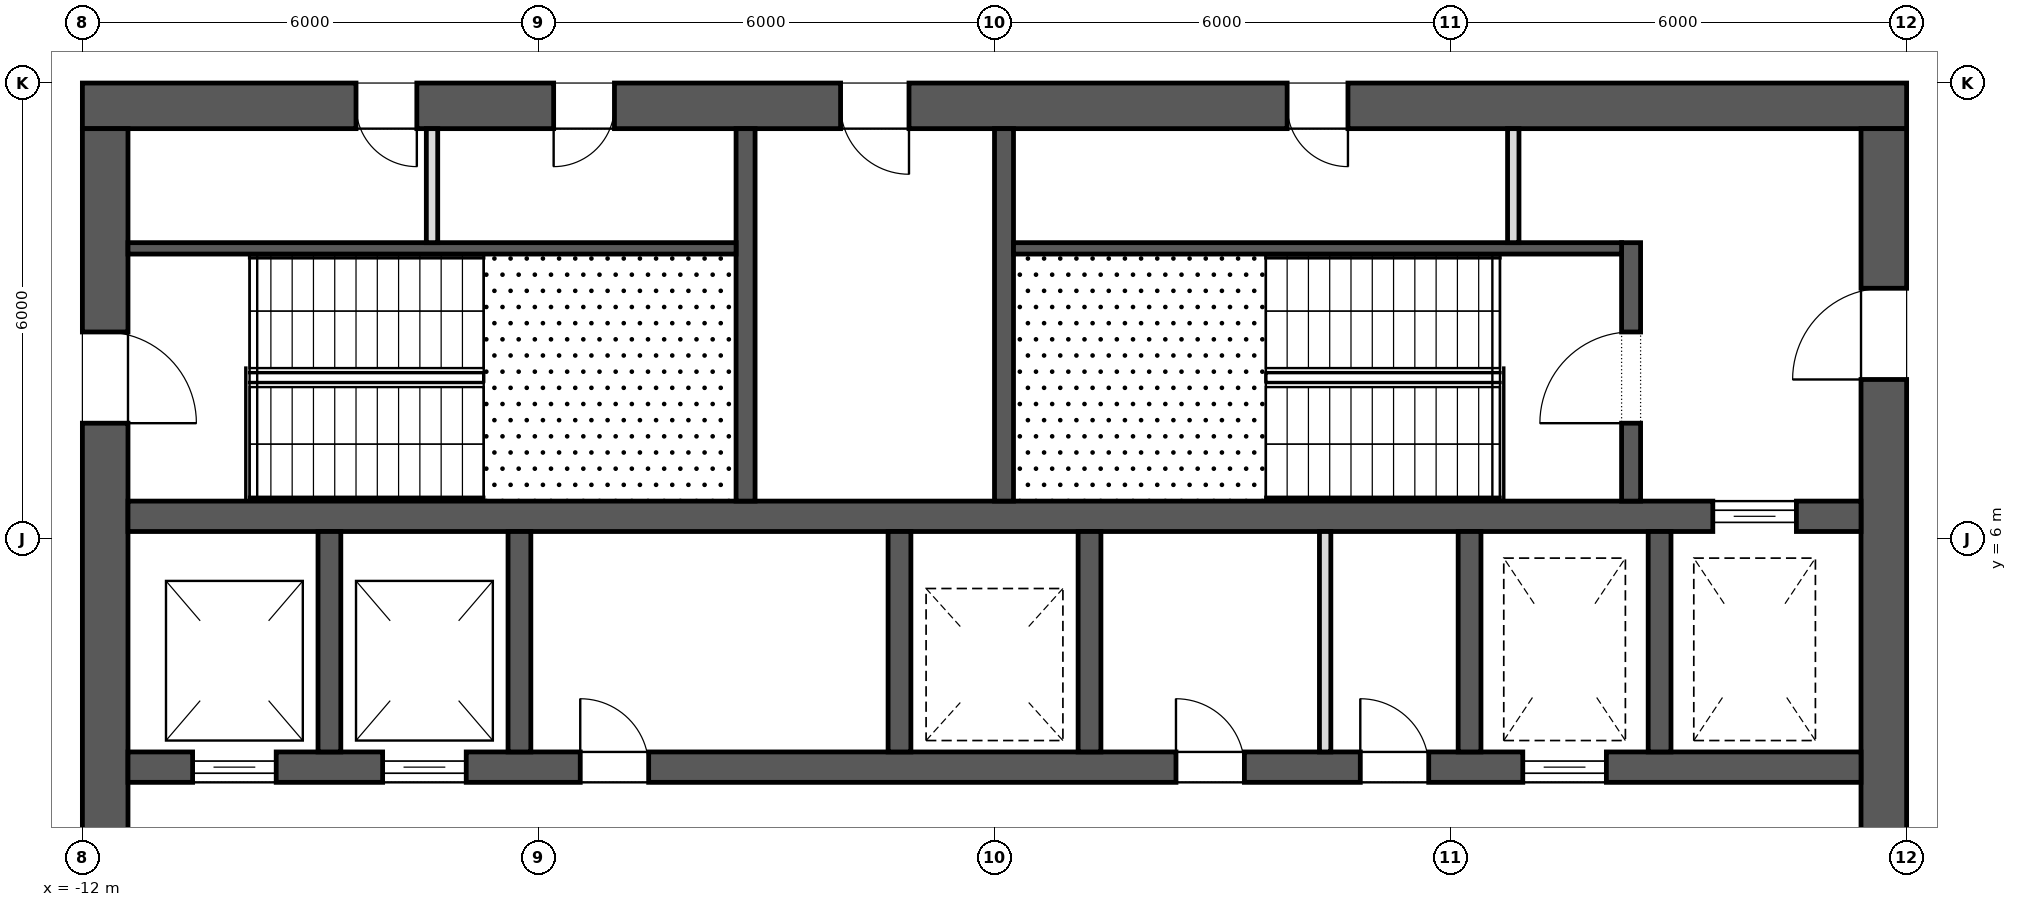
"""IFC4 building model, lengths in metres.
Left out: names, types, materials, properties, quantities, classifications, styles, units other than length and angle.
Written with IfcOpenShell. Run it as: python <this file> out.ifc"""

import sys

from ifc_helpers import new_model, si_unit, direction, frame, frame_2d, origin, place, context, subcontext, project, spatial, rectangle, extrude, element, fill, save


model = new_model("IFC4")
c1 = context("Model", 3, precision=1e-05, world=origin(), true_north=direction((0.0, 1.0)))
c2 = subcontext(c1, "Body", "Model", "MODEL_VIEW")
j1 = project(units=[si_unit("LENGTHUNIT", "METRE"), si_unit("PLANEANGLEUNIT", "RADIAN")], contexts=[c1])
p1 = place(None, origin())
s1 = spatial("IfcSite", under=j1, at=p1, CompositionType="ELEMENT")
p2 = place(p1, origin())
s2 = spatial("IfcBuilding", under=s1, at=p2, CompositionType="ELEMENT")
p3 = place(p2, frame((0.0, 0.0, 300.3)))
s3 = spatial("IfcBuildingStorey", under=s2, at=p3, CompositionType="ELEMENT", Elevation=300.3)
p4 = place(p3, frame((-12.0, 11.7, 0.0), z_axis=(0.0, 0.0, 1.0), x_axis=(1.0, 0.0, 0.0)))
e1 = element("IfcWall", 1, at=p4, inside=s3, PredefinedType="SHEAR", context=c2, shape_type="SweptSolid", body=[
    extrude(rectangle(XDim=24.0, YDim=0.6, at=frame_2d((12.0, 0.0))), origin(), (0.0, 0.0, 1.0), 4.0),
])
p5 = place(p4, frame((9.975, 0.0, 0.0)))
e2 = element("IfcOpeningElement", 2, at=p5, cuts=e1, PredefinedType="OPENING", context=c2, shape_type="SweptSolid", body=[
    extrude(rectangle(XDim=0.9, YDim=2.1, at=frame_2d((0.45, 1.05))), frame((0.0, 0.312, 0.0), z_axis=(0.0, -1.0, 0.0), x_axis=(1.0, 0.0, 0.0)), (0.0, 0.0, 1.0), 0.624),
])
p6 = place(p4, frame((3.6, 0.0, 0.0)))
e3 = element("IfcOpeningElement", 3, at=p6, cuts=e1, PredefinedType="OPENING", context=c2, shape_type="SweptSolid", body=[
    extrude(rectangle(XDim=0.8, YDim=2.1, at=frame_2d((0.4, 1.05))), frame((0.0, 0.312, 0.0), z_axis=(0.0, -1.0, 0.0), x_axis=(1.0, 0.0, 0.0)), (0.0, 0.0, 1.0), 0.624),
])
p7 = place(p4, frame((6.2, 0.0, 0.0)))
e4 = element("IfcOpeningElement", 4, at=p7, cuts=e1, PredefinedType="OPENING", context=c2, shape_type="SweptSolid", body=[
    extrude(rectangle(XDim=0.8, YDim=2.1, at=frame_2d((0.4, 1.05))), frame((0.0, 0.312, 0.0), z_axis=(0.0, -1.0, 0.0), x_axis=(1.0, 0.0, 0.0)), (0.0, 0.0, 1.0), 0.624),
])
p8 = place(p4, frame((15.85, 0.0, 0.0)))
e5 = element("IfcOpeningElement", 5, at=p8, cuts=e1, PredefinedType="OPENING", context=c2, shape_type="SweptSolid", body=[
    extrude(rectangle(XDim=0.8, YDim=2.1, at=frame_2d((0.4, 1.05))), frame((0.0, 0.312, 0.0), z_axis=(0.0, -1.0, 0.0), x_axis=(1.0, 0.0, 0.0)), (0.0, 0.0, 1.0), 0.624),
])
p9 = place(p3, frame((11.7, -11.4, 0.0), z_axis=(0.0, 0.0, 1.0), x_axis=(0.0, 1.0, 0.0)))
e6 = element("IfcWall", 6, at=p9, inside=s3, PredefinedType="SHEAR", context=c2, shape_type="SweptSolid", body=[
    extrude(rectangle(XDim=22.8, YDim=0.6, at=frame_2d((11.4, 0.0))), origin(), (0.0, 0.0, 1.0), 4.0),
])
p10 = place(p9, frame((10.2, 0.0, 0.0)))
e7 = element("IfcOpeningElement", 7, at=p10, cuts=e6, PredefinedType="OPENING", context=c2, shape_type="SweptSolid", body=[
    extrude(rectangle(XDim=2.4, YDim=2.1, at=frame_2d((1.2, 1.05))), frame((0.0, 0.312, 0.0), z_axis=(0.0, -1.0, 0.0), x_axis=(1.0, 0.0, 0.0)), (0.0, 0.0, 1.0), 0.624),
])
p11 = place(p9, frame((19.5, 0.0, 0.0)))
e8 = element("IfcOpeningElement", 8, at=p11, cuts=e6, PredefinedType="OPENING", context=c2, shape_type="SweptSolid", body=[
    extrude(rectangle(XDim=1.2, YDim=2.1, at=frame_2d((0.6, 1.05))), frame((0.0, 0.312, 0.0), z_axis=(0.0, -1.0, 0.0), x_axis=(1.0, 0.0, 0.0)), (0.0, 0.0, 1.0), 0.624),
])
p12 = place(p9, frame((2.1, 0.0, 0.0)))
e9 = element("IfcOpeningElement", 9, at=p12, cuts=e6, PredefinedType="OPENING", context=c2, shape_type="SweptSolid", body=[
    extrude(rectangle(XDim=1.2, YDim=2.1, at=frame_2d((0.6, 1.05))), frame((0.0, 0.312, 0.0), z_axis=(0.0, -1.0, 0.0), x_axis=(1.0, 0.0, 0.0)), (0.0, 0.0, 1.0), 0.624),
])
p13 = place(p3, frame((-11.7, -11.4, 0.0), z_axis=(0.0, 0.0, 1.0), x_axis=(0.0, 1.0, 0.0)))
e10 = element("IfcWall", 10, at=p13, inside=s3, PredefinedType="SHEAR", context=c2, shape_type="SweptSolid", body=[
    extrude(rectangle(XDim=22.8, YDim=0.6, at=frame_2d((11.4, 0.0))), origin(), (0.0, 0.0, 1.0), 4.0),
])
p14 = place(p13, frame((10.2, 0.0, 0.0)))
e11 = element("IfcOpeningElement", 11, at=p14, cuts=e10, PredefinedType="OPENING", context=c2, shape_type="SweptSolid", body=[
    extrude(rectangle(XDim=2.4, YDim=2.1, at=frame_2d((1.2, 1.05))), frame((0.0, 0.312, 0.0), z_axis=(0.0, -1.0, 0.0), x_axis=(1.0, 0.0, 0.0)), (0.0, 0.0, 1.0), 0.624),
])
p15 = place(p13, frame((18.925, 0.0, 0.0)))
e12 = element("IfcOpeningElement", 12, at=p15, cuts=e10, PredefinedType="OPENING", context=c2, shape_type="SweptSolid", body=[
    extrude(rectangle(XDim=1.2, YDim=2.1, at=frame_2d((0.6, 1.05))), frame((0.0, 0.312, 0.0), z_axis=(0.0, -1.0, 0.0), x_axis=(1.0, 0.0, 0.0)), (0.0, 0.0, 1.0), 0.624),
])
p16 = place(p13, frame((2.675, 0.0, 0.0)))
e13 = element("IfcOpeningElement", 13, at=p16, cuts=e10, PredefinedType="OPENING", context=c2, shape_type="SweptSolid", body=[
    extrude(rectangle(XDim=1.2, YDim=2.1, at=frame_2d((0.6, 1.05))), frame((0.0, 0.312, 0.0), z_axis=(0.0, -1.0, 0.0), x_axis=(1.0, 0.0, 0.0)), (0.0, 0.0, 1.0), 0.624),
])
p17 = place(p3, frame((-11.4, 3.0, 0.0), z_axis=(0.0, 0.0, 1.0), x_axis=(1.0, 0.0, 0.0)))
e14 = element("IfcWall", 14, at=p17, inside=s3, PredefinedType="SHEAR", context=c2, shape_type="SweptSolid", body=[
    extrude(rectangle(XDim=22.8, YDim=0.4, at=frame_2d((11.4, 0.0))), origin(), (0.0, 0.0, 1.0), 4.0),
])
p18 = place(p17, frame((0.85, 0.0, 0.0)))
e15 = element("IfcOpeningElement", 15, at=p18, cuts=e14, PredefinedType="OPENING", context=c2, shape_type="SweptSolid", body=[
    extrude(rectangle(XDim=1.1, YDim=2.1, at=frame_2d((0.55, 1.05))), frame((0.0, 0.212, 0.0), z_axis=(0.0, -1.0, 0.0), x_axis=(1.0, 0.0, 0.0)), (0.0, 0.0, 1.0), 0.424),
])
p19 = place(p17, frame((3.35, 0.0, 0.0)))
e16 = element("IfcOpeningElement", 16, at=p19, cuts=e14, PredefinedType="OPENING", context=c2, shape_type="SweptSolid", body=[
    extrude(rectangle(XDim=1.1, YDim=2.1, at=frame_2d((0.55, 1.05))), frame((0.0, 0.212, 0.0), z_axis=(0.0, -1.0, 0.0), x_axis=(1.0, 0.0, 0.0)), (0.0, 0.0, 1.0), 0.424),
])
p20 = place(p17, frame((18.35, 0.0, 0.0)))
e17 = element("IfcOpeningElement", 17, at=p20, cuts=e14, PredefinedType="OPENING", context=c2, shape_type="SweptSolid", body=[
    extrude(rectangle(XDim=1.1, YDim=2.1, at=frame_2d((0.55, 1.05))), frame((0.0, 0.212, 0.0), z_axis=(0.0, -1.0, 0.0), x_axis=(1.0, 0.0, 0.0)), (0.0, 0.0, 1.0), 0.424),
])
p21 = place(p17, frame((13.788, 0.0, 0.0)))
e18 = element("IfcOpeningElement", 18, at=p21, cuts=e14, PredefinedType="OPENING", context=c2, shape_type="SweptSolid", body=[
    extrude(rectangle(XDim=0.9, YDim=2.1, at=frame_2d((0.45, 1.05))), frame((0.0, 0.212, 0.0), z_axis=(0.0, -1.0, 0.0), x_axis=(1.0, 0.0, 0.0)), (0.0, 0.0, 1.0), 0.424),
])
p22 = place(p17, frame((16.212, 0.0, 0.0)))
e19 = element("IfcOpeningElement", 19, at=p22, cuts=e14, PredefinedType="OPENING", context=c2, shape_type="SweptSolid", body=[
    extrude(rectangle(XDim=0.9, YDim=2.1, at=frame_2d((0.45, 1.05))), frame((0.0, 0.212, 0.0), z_axis=(0.0, -1.0, 0.0), x_axis=(1.0, 0.0, 0.0)), (0.0, 0.0, 1.0), 0.424),
])
p23 = place(p17, frame((5.95, 0.0, 0.0)))
e20 = element("IfcOpeningElement", 20, at=p23, cuts=e14, PredefinedType="OPENING", context=c2, shape_type="SweptSolid", body=[
    extrude(rectangle(XDim=0.9, YDim=2.1, at=frame_2d((0.45, 1.05))), frame((0.0, 0.212, 0.0), z_axis=(0.0, -1.0, 0.0), x_axis=(1.0, 0.0, 0.0)), (0.0, 0.0, 1.0), 0.424),
])
p24 = place(p3, frame((-11.4, 6.3, 0.0), z_axis=(0.0, 0.0, 1.0), x_axis=(1.0, 0.0, 0.0)))
e21 = element("IfcWall", 21, at=p24, inside=s3, PredefinedType="SHEAR", context=c2, shape_type="SweptSolid", body=[
    extrude(rectangle(XDim=22.8, YDim=0.4, at=frame_2d((11.4, 0.0))), origin(), (0.0, 0.0, 1.0), 4.0),
])
p25 = place(p24, frame((20.85, 0.0, 0.0)))
e22 = element("IfcOpeningElement", 22, at=p25, cuts=e21, PredefinedType="OPENING", context=c2, shape_type="SweptSolid", body=[
    extrude(rectangle(XDim=1.1, YDim=2.1, at=frame_2d((0.55, 1.05))), frame((0.0, 0.212, 0.0), z_axis=(0.0, -1.0, 0.0), x_axis=(1.0, 0.0, 0.0)), (0.0, 0.0, 1.0), 0.424),
])
for number, where, z_axis, x_axis in (
    (23, (-8.75, 3.2, 0.0), (0.0, 0.0, 1.0), (0.0, 1.0, 0.0)),
    (24, (-6.25, 3.2, 0.0), (0.0, 0.0, 1.0), (0.0, 1.0, 0.0)),
    (25, (-1.25, 3.2, 0.0), (0.0, 0.0, 1.0), (0.0, 1.0, 0.0)),
    (26, (1.25, 3.2, 0.0), (0.0, 0.0, 1.0), (0.0, 1.0, 0.0)),
    (27, (6.25, 3.2, 0.0), (0.0, 0.0, 1.0), (0.0, 1.0, 0.0)),
    (28, (8.75, 3.2, 0.0), (0.0, 0.0, 1.0), (0.0, 1.0, 0.0)),
):
    element("IfcWall", number, at=place(p3, frame(where, z_axis=z_axis, x_axis=x_axis)), inside=s3, PredefinedType="SHEAR", context=c2, shape_type="SweptSolid", body=[
        extrude(rectangle(XDim=2.9, YDim=0.3, at=frame_2d((1.45, 0.0))), origin(), (0.0, 0.0, 1.0), 4.0),
    ])
for number, where, z_axis, x_axis in (
    (29, (-3.275, 6.5, 0.0), (0.0, 0.0, 1.0), (0.0, 1.0, 0.0)),
    (30, (0.125, 6.5, 0.0), (0.0, 0.0, 1.0), (0.0, 1.0, 0.0)),
):
    element("IfcWall", number, at=place(p3, frame(where, z_axis=z_axis, x_axis=x_axis)), inside=s3, PredefinedType="SHEAR", context=c2, shape_type="SweptSolid", body=[
        extrude(rectangle(XDim=4.9, YDim=0.25, at=frame_2d((2.45, 0.0))), origin(), (0.0, 0.0, 1.0), 3.7),
    ])
p26 = place(p3, frame((8.375, 6.5, 0.0), z_axis=(0.0, 0.0, 1.0), x_axis=(0.0, 1.0, 0.0)))
e31 = element("IfcWall", 31, at=p26, inside=s3, PredefinedType="SHEAR", context=c2, shape_type="SweptSolid", body=[
    extrude(rectangle(XDim=3.4, YDim=0.25, at=frame_2d((1.7, 0.0))), origin(), (0.0, 0.0, 1.0), 3.7),
])
p27 = place(p26, frame((1.025, 0.0, 0.0)))
e32 = element("IfcOpeningElement", 32, at=p27, cuts=e31, PredefinedType="OPENING", context=c2, shape_type="SweptSolid", body=[
    extrude(rectangle(XDim=1.2, YDim=2.1, at=frame_2d((0.6, 1.05))), frame((0.0, 0.137, 0.0), z_axis=(0.0, -1.0, 0.0), x_axis=(1.0, 0.0, 0.0)), (0.0, 0.0, 1.0), 0.274),
])
for number, where, z_axis, x_axis in (
    (33, (-11.4, 9.825, 0.0), (0.0, 0.0, 1.0), (1.0, 0.0, 0.0)),
    (34, (0.25, 9.825, 0.0), (0.0, 0.0, 1.0), (1.0, 0.0, 0.0)),
):
    element("IfcWall", number, at=place(p3, frame(where, z_axis=z_axis, x_axis=x_axis)), inside=s3, PredefinedType="SHEAR", context=c2, shape_type="SweptSolid", body=[
        extrude(rectangle(XDim=8.0, YDim=0.15, at=frame_2d((4.0, 0.0))), origin(), (0.0, 0.0, 1.0), 3.7),
    ])
for number, where, z_axis, x_axis in (
    (35, (-7.4, 9.9, 0.0), (0.0, 0.0, 1.0), (0.0, 1.0, 0.0)),
    (36, (6.825, 9.9, 0.0), (0.0, 0.0, 1.0), (0.0, 1.0, 0.0)),
):
    element("IfcWall", number, at=place(p3, frame(where, z_axis=z_axis, x_axis=x_axis)), inside=s3, PredefinedType="PARTITIONING", context=c2, shape_type="SweptSolid", body=[
        extrude(rectangle(XDim=1.5, YDim=0.15, at=frame_2d((0.75, 0.0))), origin(), (0.0, 0.0, 1.0), 3.7),
    ])
p28 = place(p3, frame((4.35, 3.2, 0.0), z_axis=(0.0, 0.0, 1.0), x_axis=(0.0, 1.0, 0.0)))
e37 = element("IfcWall", 37, at=p28, inside=s3, PredefinedType="PARTITIONING", context=c2, shape_type="SweptSolid", body=[
    extrude(rectangle(XDim=2.9, YDim=0.15, at=frame_2d((1.45, 0.0))), origin(), (0.0, 0.0, 1.0), 3.7),
])
p29 = place(p25, origin())
e38 = element("IfcDoor", 38, at=p29, inside=s3, OperationType="SLIDING_TO_LEFT", PredefinedType="DOOR", context=c2, shape_type="SweptSolid", body=[
    extrude(rectangle(XDim=1.1, YDim=2.1, at=frame_2d((0.55, 1.05))), frame((0.0, 0.025, 0.0), z_axis=(0.0, -1.0, 0.0), x_axis=(1.0, 0.0, 0.0)), (0.0, 0.0, 1.0), 0.05),
])
fill(e22, e38)
p30 = place(p18, origin())
e39 = element("IfcDoor", 39, at=p30, inside=s3, OperationType="SLIDING_TO_LEFT", PredefinedType="DOOR", context=c2, shape_type="SweptSolid", body=[
    extrude(rectangle(XDim=1.1, YDim=2.1, at=frame_2d((0.55, 1.05))), frame((0.0, 0.025, 0.0), z_axis=(0.0, -1.0, 0.0), x_axis=(1.0, 0.0, 0.0)), (0.0, 0.0, 1.0), 0.05),
])
fill(e15, e39)
p31 = place(p19, origin())
e40 = element("IfcDoor", 40, at=p31, inside=s3, OperationType="SLIDING_TO_LEFT", PredefinedType="DOOR", context=c2, shape_type="SweptSolid", body=[
    extrude(rectangle(XDim=1.1, YDim=2.1, at=frame_2d((0.55, 1.05))), frame((0.0, 0.025, 0.0), z_axis=(0.0, -1.0, 0.0), x_axis=(1.0, 0.0, 0.0)), (0.0, 0.0, 1.0), 0.05),
])
fill(e16, e40)
p32 = place(p20, origin())
e41 = element("IfcDoor", 41, at=p32, inside=s3, OperationType="SLIDING_TO_LEFT", PredefinedType="DOOR", context=c2, shape_type="SweptSolid", body=[
    extrude(rectangle(XDim=1.1, YDim=2.1, at=frame_2d((0.55, 1.05))), frame((0.0, 0.025, 0.0), z_axis=(0.0, -1.0, 0.0), x_axis=(1.0, 0.0, 0.0)), (0.0, 0.0, 1.0), 0.05),
])
fill(e17, e41)
p33 = place(p15, frame((1.2, 0.0, 0.0), z_axis=(0.0, 0.0, 1.0), x_axis=(-1.0, 0.0, 0.0)))
e42 = element("IfcDoor", 42, at=p33, inside=s3, OperationType="SINGLE_SWING_LEFT", PredefinedType="DOOR", context=c2, shape_type="SweptSolid", body=[
    extrude(rectangle(XDim=1.2, YDim=2.1, at=frame_2d((0.6, 1.05))), frame((0.0, 0.025, 0.0), z_axis=(0.0, -1.0, 0.0), x_axis=(1.0, 0.0, 0.0)), (0.0, 0.0, 1.0), 0.05),
])
fill(e12, e42)
p34 = place(p27, origin())
e43 = element("IfcDoor", 43, at=p34, inside=s3, OperationType="SINGLE_SWING_RIGHT", PredefinedType="DOOR", context=c2, shape_type="SweptSolid", body=[
    extrude(rectangle(XDim=1.2, YDim=2.1, at=frame_2d((0.6, 1.05))), frame((0.0, 0.025, 0.0), z_axis=(0.0, -1.0, 0.0), x_axis=(1.0, 0.0, 0.0)), (0.0, 0.0, 1.0), 0.05),
])
fill(e32, e43)
p35 = place(p11, origin())
e44 = element("IfcDoor", 44, at=p35, inside=s3, OperationType="SINGLE_SWING_RIGHT", PredefinedType="DOOR", context=c2, shape_type="SweptSolid", body=[
    extrude(rectangle(XDim=1.2, YDim=2.1, at=frame_2d((0.6, 1.05))), frame((0.0, 0.025, 0.0), z_axis=(0.0, -1.0, 0.0), x_axis=(1.0, 0.0, 0.0)), (0.0, 0.0, 1.0), 0.05),
])
fill(e8, e44)
p36 = place(p5, frame((0.9, 0.0, 0.0), z_axis=(0.0, 0.0, 1.0), x_axis=(-1.0, 0.0, 0.0)))
e45 = element("IfcDoor", 45, at=p36, inside=s3, OperationType="SINGLE_SWING_RIGHT", PredefinedType="DOOR", context=c2, shape_type="SweptSolid", body=[
    extrude(rectangle(XDim=0.9, YDim=2.1, at=frame_2d((0.45, 1.05))), frame((0.0, 0.025, 0.0), z_axis=(0.0, -1.0, 0.0), x_axis=(1.0, 0.0, 0.0)), (0.0, 0.0, 1.0), 0.05),
])
fill(e2, e45)
p37 = place(p6, frame((0.8, 0.0, 0.0), z_axis=(0.0, 0.0, 1.0), x_axis=(-1.0, 0.0, 0.0)))
e46 = element("IfcDoor", 46, at=p37, inside=s3, OperationType="SINGLE_SWING_RIGHT", PredefinedType="DOOR", context=c2, shape_type="SweptSolid", body=[
    extrude(rectangle(XDim=0.8, YDim=2.1, at=frame_2d((0.4, 1.05))), frame((0.0, 0.025, 0.0), z_axis=(0.0, -1.0, 0.0), x_axis=(1.0, 0.0, 0.0)), (0.0, 0.0, 1.0), 0.05),
])
fill(e3, e46)
p38 = place(p7, frame((0.8, 0.0, 0.0), z_axis=(0.0, 0.0, 1.0), x_axis=(-1.0, 0.0, 0.0)))
e47 = element("IfcDoor", 47, at=p38, inside=s3, OperationType="SINGLE_SWING_LEFT", PredefinedType="DOOR", context=c2, shape_type="SweptSolid", body=[
    extrude(rectangle(XDim=0.8, YDim=2.1, at=frame_2d((0.4, 1.05))), frame((0.0, 0.025, 0.0), z_axis=(0.0, -1.0, 0.0), x_axis=(1.0, 0.0, 0.0)), (0.0, 0.0, 1.0), 0.05),
])
fill(e4, e47)
p39 = place(p8, frame((0.8, 0.0, 0.0), z_axis=(0.0, 0.0, 1.0), x_axis=(-1.0, 0.0, 0.0)))
e48 = element("IfcDoor", 48, at=p39, inside=s3, OperationType="SINGLE_SWING_RIGHT", PredefinedType="DOOR", context=c2, shape_type="SweptSolid", body=[
    extrude(rectangle(XDim=0.8, YDim=2.1, at=frame_2d((0.4, 1.05))), frame((0.0, 0.025, 0.0), z_axis=(0.0, -1.0, 0.0), x_axis=(1.0, 0.0, 0.0)), (0.0, 0.0, 1.0), 0.05),
])
fill(e5, e48)
p40 = place(p21, origin())
e49 = element("IfcDoor", 49, at=p40, inside=s3, OperationType="SINGLE_SWING_RIGHT", PredefinedType="DOOR", context=c2, shape_type="SweptSolid", body=[
    extrude(rectangle(XDim=0.9, YDim=2.1, at=frame_2d((0.45, 1.05))), frame((0.0, 0.025, 0.0), z_axis=(0.0, -1.0, 0.0), x_axis=(1.0, 0.0, 0.0)), (0.0, 0.0, 1.0), 0.05),
])
fill(e18, e49)
p41 = place(p22, origin())
e50 = element("IfcDoor", 50, at=p41, inside=s3, OperationType="SINGLE_SWING_RIGHT", PredefinedType="DOOR", context=c2, shape_type="SweptSolid", body=[
    extrude(rectangle(XDim=0.9, YDim=2.1, at=frame_2d((0.45, 1.05))), frame((0.0, 0.025, 0.0), z_axis=(0.0, -1.0, 0.0), x_axis=(1.0, 0.0, 0.0)), (0.0, 0.0, 1.0), 0.05),
])
fill(e19, e50)
p42 = place(p23, origin())
e51 = element("IfcDoor", 51, at=p42, inside=s3, OperationType="SINGLE_SWING_RIGHT", PredefinedType="DOOR", context=c2, shape_type="SweptSolid", body=[
    extrude(rectangle(XDim=0.9, YDim=2.1, at=frame_2d((0.45, 1.05))), frame((0.0, 0.025, 0.0), z_axis=(0.0, -1.0, 0.0), x_axis=(1.0, 0.0, 0.0)), (0.0, 0.0, 1.0), 0.05),
])
fill(e20, e51)
save(model, sys.argv[1])
